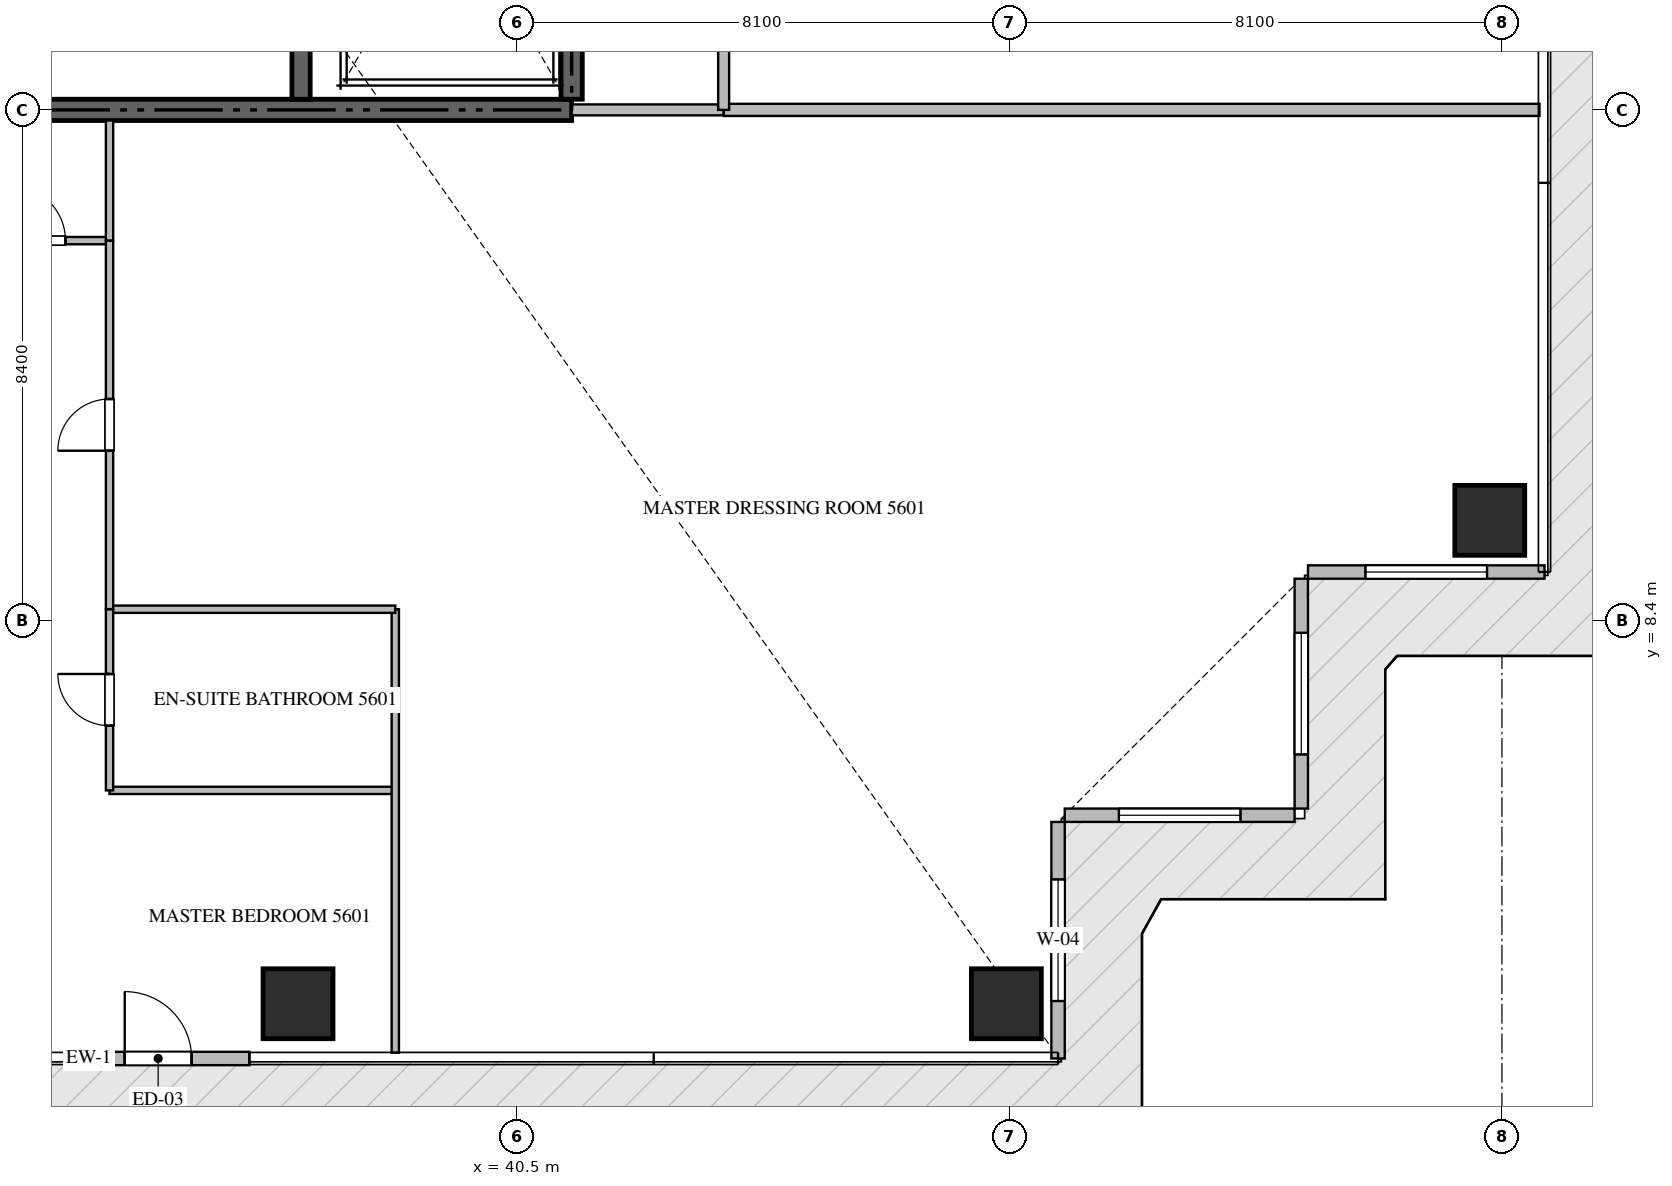
"""IFC4 building model, lengths in metres.
Left out: names, types, materials, properties, quantities, classifications, styles, units other than length and angle.
Written with IfcOpenShell. Run it as: python <this file> out.ifc"""

import sys

from ifc_helpers import new_model, si_unit, direction, frame, frame_2d, origin, origin_2d, place, context, subcontext, project, spatial, rectangle, extrude, source, transform, mapped, element, fill, save


model = new_model("IFC4")
c1 = context("Model", 3, precision=1e-05, world=origin(), true_north=direction((0.0, 1.0)))
c2 = subcontext(c1, "Body", "Model", "MODEL_VIEW")
j1 = project(units=[si_unit("LENGTHUNIT", "METRE"), si_unit("PLANEANGLEUNIT", "RADIAN")], contexts=[c1])
p1 = place(None, origin())
s1 = spatial("IfcSite", under=j1, at=p1, CompositionType="ELEMENT")
p2 = place(p1, origin())
s2 = spatial("IfcBuilding", under=s1, at=p2, CompositionType="ELEMENT")
p3 = place(p2, frame((0.0, 0.0, 225.85)))
s3 = spatial("IfcBuildingStorey", under=s2, at=p3, CompositionType="ELEMENT", Elevation=225.85)
p4 = place(p3, frame((23.4, 16.8, -0.26), z_axis=(0.0, 0.0, 1.0), x_axis=(1.0, 0.0, 0.0)))
e1 = element("IfcWall", 1, at=p4, inside=s3, PredefinedType="SHEAR", context=c2, shape_type="SweptSolid", body=[
    extrude(rectangle(XDim=18.0, YDim=0.35, at=frame_2d((9.0, 0.0))), origin(), (0.0, 0.0, 1.0), 3.848),
])
p5 = place(p3, frame((41.4, 16.975, -0.26), z_axis=(0.0, 0.0, 1.0), x_axis=(0.0, 1.0, 0.0)))
e2 = element("IfcWall", 2, at=p5, inside=s3, PredefinedType="SHEAR", context=c2, shape_type="SweptSolid", body=[
    extrude(rectangle(XDim=8.375, YDim=0.35, at=frame_2d((4.188, 0.0))), origin(), (0.0, 0.0, 1.0), 3.848),
])
p6 = place(p3, frame((36.95, 16.975, -0.26), z_axis=(0.0, 0.0, 1.0), x_axis=(0.0, 1.0, 0.0)))
e3 = element("IfcWall", 3, at=p6, inside=s3, PredefinedType="SHEAR", context=c2, shape_type="SweptSolid", body=[
    extrude(rectangle(XDim=8.375, YDim=0.3, at=frame_2d((4.188, 0.0))), origin(), (0.0, 0.0, 1.0), 3.848),
])
m1 = source(origin(), c2, "Body", "SweptSolid", [
    extrude(rectangle(XDim=1.15, YDim=1.15, at=origin_2d()), origin(), (0.0, 0.0, 1.0), 3.85),
])
for number, where, z_axis, x_axis in (
    (4, (36.9, 2.1, -0.26), (0.0, 0.0, 1.0), (1.0, 0.0, 0.0)),
    (5, (48.55, 2.1, -0.26), (0.0, 0.0, 1.0), (1.0, 0.0, 0.0)),
    (6, (56.5, 10.05, -0.26), (0.0, 0.0, 1.0), (1.0, 0.0, 0.0)),
):
    element("IfcColumn", number, at=place(p3, frame(where, z_axis=z_axis, x_axis=x_axis)), inside=s3, PredefinedType="COLUMN", context=c2, shape_type="MappedRepresentation", body=[
        mapped(m1, transform((0.0, 0.0, 0.0), scale=1.0)),
    ])
p7 = place(p3, frame((33.1, 1.2, 0.0), z_axis=(0.0, 0.0, 1.0), x_axis=(1.0, 0.0, 0.0)))
e7 = element("IfcWall", 7, at=p7, inside=s3, PredefinedType="ELEMENTEDWALL", context=c2, shape_type="SweptSolid", body=[
    extrude(rectangle(XDim=3.0, YDim=0.22, at=frame_2d((1.5, 0.0))), origin(), (0.0, 0.0, 1.0), 3.575),
])
p8 = place(p7, frame((0.95, 0.0, 0.0)))
e8 = element("IfcOpeningElement", 8, at=p8, cuts=e7, PredefinedType="OPENING", context=c2, shape_type="SweptSolid", body=[
    extrude(rectangle(XDim=1.1, YDim=2.2, at=frame_2d((0.55, 1.1))), frame((0.0, 0.12, 0.0), z_axis=(0.0, -1.0, 0.0), x_axis=(1.0, 0.0, 0.0)), (0.0, 0.0, 1.0), 0.24),
])
p9 = place(p3, frame((49.4, 1.2, 0.0), z_axis=(0.0, 0.0, 1.0), x_axis=(0.0, 1.0, 0.0)))
e9 = element("IfcWall", 9, at=p9, inside=s3, PredefinedType="ELEMENTEDWALL", context=c2, shape_type="SweptSolid", body=[
    extrude(rectangle(XDim=3.89, YDim=0.22, at=frame_2d((1.945, 0.0))), origin(), (0.0, 0.0, 1.0), 3.575),
])
p10 = place(p9, frame((0.945, 0.0, 0.65)))
e10 = element("IfcOpeningElement", 10, at=p10, cuts=e9, PredefinedType="OPENING", context=c2, shape_type="SweptSolid", body=[
    extrude(rectangle(XDim=2.0, YDim=2.2, at=frame_2d((1.0, 1.1))), frame((0.0, 0.12, 0.0), z_axis=(0.0, -1.0, 0.0), x_axis=(1.0, 0.0, 0.0)), (0.0, 0.0, 1.0), 0.24),
])
p11 = place(p3, frame((49.51, 5.2, 0.0), z_axis=(0.0, 0.0, 1.0), x_axis=(1.0, 0.0, 0.0)))
e11 = element("IfcWall", 11, at=p11, inside=s3, PredefinedType="ELEMENTEDWALL", context=c2, shape_type="SweptSolid", body=[
    extrude(rectangle(XDim=3.78, YDim=0.22, at=frame_2d((1.89, 0.0))), origin(), (0.0, 0.0, 1.0), 3.575),
])
p12 = place(p11, frame((0.89, 0.0, 0.65)))
e12 = element("IfcOpeningElement", 12, at=p12, cuts=e11, PredefinedType="OPENING", context=c2, shape_type="SweptSolid", body=[
    extrude(rectangle(XDim=2.0, YDim=2.2, at=frame_2d((1.0, 1.1))), frame((0.0, 0.12, 0.0), z_axis=(0.0, -1.0, 0.0), x_axis=(1.0, 0.0, 0.0)), (0.0, 0.0, 1.0), 0.24),
])
p13 = place(p3, frame((53.4, 5.31, 0.0), z_axis=(0.0, 0.0, 1.0), x_axis=(0.0, 1.0, 0.0)))
e13 = element("IfcWall", 13, at=p13, inside=s3, PredefinedType="ELEMENTEDWALL", context=c2, shape_type="SweptSolid", body=[
    extrude(rectangle(XDim=3.78, YDim=0.22, at=frame_2d((1.89, 0.0))), origin(), (0.0, 0.0, 1.0), 3.575),
])
p14 = place(p13, frame((0.89, 0.0, 0.65)))
e14 = element("IfcOpeningElement", 14, at=p14, cuts=e13, PredefinedType="OPENING", context=c2, shape_type="SweptSolid", body=[
    extrude(rectangle(XDim=2.0, YDim=2.2, at=frame_2d((1.0, 1.1))), frame((0.0, 0.12, 0.0), z_axis=(0.0, -1.0, 0.0), x_axis=(1.0, 0.0, 0.0)), (0.0, 0.0, 1.0), 0.24),
])
p15 = place(p3, frame((53.51, 9.2, 0.0), z_axis=(0.0, 0.0, 1.0), x_axis=(1.0, 0.0, 0.0)))
e15 = element("IfcWall", 15, at=p15, inside=s3, PredefinedType="ELEMENTEDWALL", context=c2, shape_type="SweptSolid", body=[
    extrude(rectangle(XDim=3.89, YDim=0.22, at=frame_2d((1.945, 0.0))), origin(), (0.0, 0.0, 1.0), 3.575),
])
p16 = place(p15, frame((0.945, 0.0, 0.65)))
e16 = element("IfcOpeningElement", 16, at=p16, cuts=e15, PredefinedType="OPENING", context=c2, shape_type="SweptSolid", body=[
    extrude(rectangle(XDim=2.0, YDim=2.2, at=frame_2d((1.0, 1.1))), frame((0.0, 0.12, 0.0), z_axis=(0.0, -1.0, 0.0), x_axis=(1.0, 0.0, 0.0)), (0.0, 0.0, 1.0), 0.24),
])
p17 = place(p3, frame((43.9, 16.8, 0.0), z_axis=(0.0, 0.0, 1.0), x_axis=(1.0, 0.0, 0.0)))
e17 = element("IfcWall", 17, at=p17, inside=s3, PredefinedType="PARTITIONING", context=c2, shape_type="SweptSolid", body=[
    extrude(rectangle(XDim=13.418, YDim=0.2, at=frame_2d((6.709, 0.0))), origin(), (0.0, 0.0, 1.0), 3.59),
])
p18 = place(p3, frame((41.402, 16.8, 0.0), z_axis=(0.0, 0.0, 1.0), x_axis=(1.0, 0.0, 0.0)))
e18 = element("IfcWall", 18, at=p18, inside=s3, PredefinedType="PARTITIONING", context=c2, shape_type="SweptSolid", body=[
    extrude(rectangle(XDim=2.496, YDim=0.18, at=frame_2d((1.248, 0.0))), origin(), (0.0, 0.0, 1.0), 3.59),
])
p19 = place(p3, frame((43.9, 16.8, 0.0), z_axis=(0.0, 0.0, 1.0), x_axis=(0.0, 1.0, 0.0)))
e19 = element("IfcWall", 19, at=p19, inside=s3, PredefinedType="PARTITIONING", context=c2, shape_type="SweptSolid", body=[
    extrude(rectangle(XDim=16.8, YDim=0.18, at=frame_2d((8.4, 0.0))), origin(), (0.0, 0.0, 1.0), 3.59),
])
p20 = place(p19, frame((1.3, 0.0, 0.0)))
e20 = element("IfcOpeningElement", 20, at=p20, cuts=e19, PredefinedType="OPENING", context=c2, shape_type="SweptSolid", body=[
    extrude(rectangle(XDim=1.0, YDim=2.15, at=frame_2d((0.5, 1.075))), frame((0.0, 0.1, 0.0), z_axis=(0.0, -1.0, 0.0), x_axis=(1.0, 0.0, 0.0)), (0.0, 0.0, 1.0), 0.2),
])
p21 = place(p3, frame((31.452, 14.65, 0.0), z_axis=(0.0, 0.0, 1.0), x_axis=(1.0, 0.0, 0.0)))
e21 = element("IfcWall", 21, at=p21, inside=s3, PredefinedType="PARTITIONING", context=c2, shape_type="SweptSolid", body=[
    extrude(rectangle(XDim=2.348, YDim=0.12, at=frame_2d((1.174, 0.0))), origin(), (0.0, 0.0, 1.0), 3.59),
])
p22 = place(p21, frame((0.724, 0.0, 0.0)))
e22 = element("IfcOpeningElement", 22, at=p22, cuts=e21, PredefinedType="OPENING", context=c2, shape_type="SweptSolid", body=[
    extrude(rectangle(XDim=0.9, YDim=2.1, at=frame_2d((0.45, 1.05))), frame((0.0, 0.07, 0.0), z_axis=(0.0, -1.0, 0.0), x_axis=(1.0, 0.0, 0.0)), (0.0, 0.0, 1.0), 0.14),
])
p23 = place(p3, frame((33.8, 5.609, 0.0), z_axis=(0.0, 0.0, 1.0), x_axis=(1.0, 0.0, 0.0)))
e23 = element("IfcWall", 23, at=p23, inside=s3, PredefinedType="PARTITIONING", context=c2, shape_type="SweptSolid", body=[
    extrude(rectangle(XDim=4.7, YDim=0.12, at=frame_2d((2.35, 0.0))), origin(), (0.0, 0.0, 1.0), 3.59),
])
p24 = place(p3, frame((38.5, 1.295, 0.0), z_axis=(0.0, 0.0, 1.0), x_axis=(0.0, 1.0, 0.0)))
e24 = element("IfcWall", 24, at=p24, inside=s3, PredefinedType="PARTITIONING", context=c2, shape_type="SweptSolid", body=[
    extrude(rectangle(XDim=7.293, YDim=0.12, at=frame_2d((3.646, 0.0))), origin(), (0.0, 0.0, 1.0), 3.59),
])
p25 = place(p3, frame((33.8, 8.588, 0.0), z_axis=(0.0, 0.0, 1.0), x_axis=(1.0, 0.0, 0.0)))
e25 = element("IfcWall", 25, at=p25, inside=s3, PredefinedType="PARTITIONING", context=c2, shape_type="SweptSolid", body=[
    extrude(rectangle(XDim=4.7, YDim=0.12, at=frame_2d((2.35, 0.0))), origin(), (0.0, 0.0, 1.0), 3.59),
])
p26 = place(p3, frame((33.8, 5.609, 0.0), z_axis=(0.0, 0.0, 1.0), x_axis=(0.0, 1.0, 0.0)))
e26 = element("IfcWall", 26, at=p26, inside=s3, PredefinedType="PARTITIONING", context=c2, shape_type="SweptSolid", body=[
    extrude(rectangle(XDim=2.979, YDim=0.12, at=frame_2d((1.49, 0.0))), origin(), (0.0, 0.0, 1.0), 3.59),
])
p27 = place(p26, frame((1.064, 0.0, 0.0)))
e27 = element("IfcOpeningElement", 27, at=p27, cuts=e26, PredefinedType="OPENING", context=c2, shape_type="SweptSolid", body=[
    extrude(rectangle(XDim=0.85, YDim=2.1, at=frame_2d((0.425, 1.05))), frame((0.0, 0.07, 0.0), z_axis=(0.0, -1.0, 0.0), x_axis=(1.0, 0.0, 0.0)), (0.0, 0.0, 1.0), 0.14),
])
p28 = place(p3, frame((33.8, 8.59, 0.0), z_axis=(0.0, 0.0, 1.0), x_axis=(0.0, 1.0, 0.0)))
e28 = element("IfcWall", 28, at=p28, inside=s3, PredefinedType="PARTITIONING", context=c2, shape_type="SweptSolid", body=[
    extrude(rectangle(XDim=6.06, YDim=0.12, at=frame_2d((3.03, 0.0))), origin(), (0.0, 0.0, 1.0), 3.59),
])
p29 = place(p28, frame((2.605, 0.0, 0.0)))
e29 = element("IfcOpeningElement", 29, at=p29, cuts=e28, PredefinedType="OPENING", context=c2, shape_type="SweptSolid", body=[
    extrude(rectangle(XDim=0.85, YDim=2.1, at=frame_2d((0.425, 1.05))), frame((0.0, 0.07, 0.0), z_axis=(0.0, -1.0, 0.0), x_axis=(1.0, 0.0, 0.0)), (0.0, 0.0, 1.0), 0.14),
])
p30 = place(p3, frame((33.8, 14.652, 0.0), z_axis=(0.0, 0.0, 1.0), x_axis=(0.0, 1.0, 0.0)))
e30 = element("IfcWall", 30, at=p30, inside=s3, PredefinedType="PARTITIONING", context=c2, shape_type="SweptSolid", body=[
    extrude(rectangle(XDim=1.973, YDim=0.12, at=frame_2d((0.986, 0.0))), origin(), (0.0, 0.0, 1.0), 3.59),
])
m2 = source(origin(), c2, "Body", "SweptSolid", [
    extrude(rectangle(XDim=1.1, YDim=2.2, at=frame_2d((0.55, 1.1))), frame((0.0, 0.025, 0.0), z_axis=(0.0, -1.0, 0.0), x_axis=(1.0, 0.0, 0.0)), (0.0, 0.0, 1.0), 0.05),
])
p31 = place(p8, origin())
e31 = element("IfcDoor", 31, at=p31, inside=s3, OperationType="SINGLE_SWING_LEFT", PredefinedType="DOOR", context=c2, shape_type="MappedRepresentation", body=[
    mapped(m2, transform((0.0, 0.0, 0.0), scale=1.0)),
])
fill(e8, e31)
m3 = source(origin(), c2, "Body", "SweptSolid", [
    extrude(rectangle(XDim=2.0, YDim=2.2, at=frame_2d((1.0, 1.1))), frame((0.0, 0.03, 0.0), z_axis=(0.0, -1.0, 0.0), x_axis=(1.0, 0.0, 0.0)), (0.0, 0.0, 1.0), 0.06),
])
p32 = place(p10, origin())
e32 = element("IfcWindow", 32, at=p32, inside=s3, PartitioningType="SINGLE_PANEL", PredefinedType="WINDOW", context=c2, shape_type="MappedRepresentation", body=[
    mapped(m3, transform((0.0, 0.0, 0.0), scale=1.0)),
])
fill(e10, e32)
p33 = place(p12, origin())
e33 = element("IfcWindow", 33, at=p33, inside=s3, PartitioningType="SINGLE_PANEL", PredefinedType="WINDOW", context=c2, shape_type="MappedRepresentation", body=[
    mapped(m3, transform((0.0, 0.0, 0.0), scale=1.0)),
])
fill(e12, e33)
p34 = place(p14, origin())
e34 = element("IfcWindow", 34, at=p34, inside=s3, PartitioningType="SINGLE_PANEL", PredefinedType="WINDOW", context=c2, shape_type="MappedRepresentation", body=[
    mapped(m3, transform((0.0, 0.0, 0.0), scale=1.0)),
])
fill(e14, e34)
p35 = place(p16, origin())
e35 = element("IfcWindow", 35, at=p35, inside=s3, PartitioningType="SINGLE_PANEL", PredefinedType="WINDOW", context=c2, shape_type="MappedRepresentation", body=[
    mapped(m3, transform((0.0, 0.0, 0.0), scale=1.0)),
])
fill(e16, e35)
m4 = source(origin(), c2, "Body", "SweptSolid", [
    extrude(rectangle(XDim=0.9, YDim=2.1, at=frame_2d((0.45, 1.05))), frame((0.0, 0.025, 0.0), z_axis=(0.0, -1.0, 0.0), x_axis=(1.0, 0.0, 0.0)), (0.0, 0.0, 1.0), 0.05),
])
p36 = place(p22, origin())
e36 = element("IfcDoor", 36, at=p36, inside=s3, OperationType="SINGLE_SWING_LEFT", PredefinedType="DOOR", context=c2, shape_type="MappedRepresentation", body=[
    mapped(m4, transform((0.0, 0.0, 0.0), scale=1.0)),
])
fill(e22, e36)
m5 = source(origin(), c2, "Body", "SweptSolid", [
    extrude(rectangle(XDim=0.85, YDim=2.1, at=frame_2d((0.425, 1.05))), frame((0.0, 0.025, 0.0), z_axis=(0.0, -1.0, 0.0), x_axis=(1.0, 0.0, 0.0)), (0.0, 0.0, 1.0), 0.05),
])
p37 = place(p27, origin())
e37 = element("IfcDoor", 37, at=p37, inside=s3, OperationType="SINGLE_SWING_RIGHT", PredefinedType="DOOR", context=c2, shape_type="MappedRepresentation", body=[
    mapped(m5, transform((0.0, 0.0, 0.0), scale=1.0)),
])
fill(e27, e37)
p38 = place(p29, origin())
e38 = element("IfcDoor", 38, at=p38, inside=s3, OperationType="SINGLE_SWING_LEFT", PredefinedType="DOOR", context=c2, shape_type="MappedRepresentation", body=[
    mapped(m5, transform((0.0, 0.0, 0.0), scale=1.0)),
])
fill(e29, e38)
save(model, sys.argv[1])
